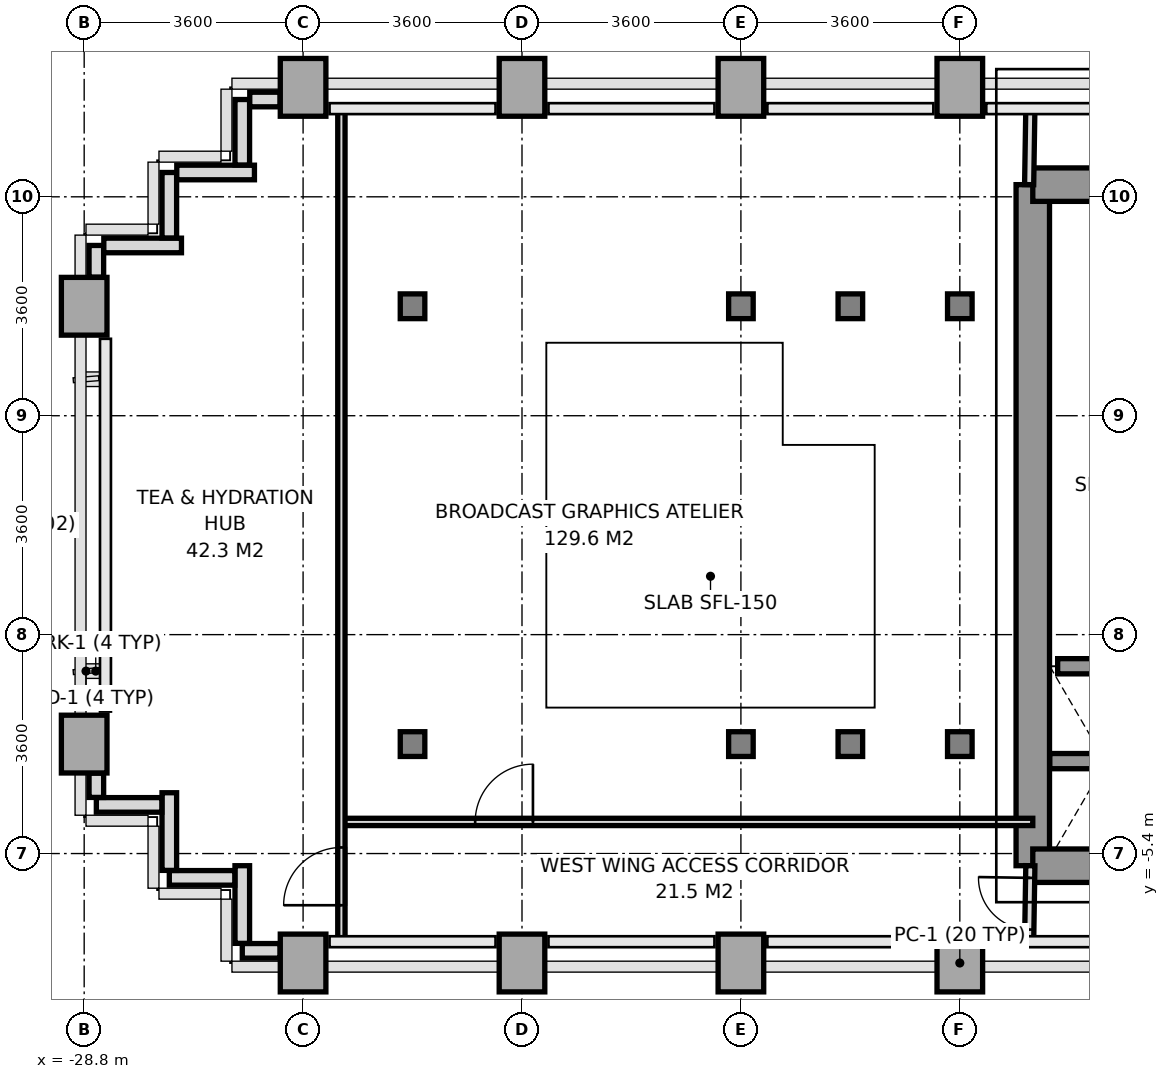
"""IFC4 building model, lengths in metres.
Left out: names, types, materials, properties, quantities, classifications, styles, units other than length and angle.
Written with IfcOpenShell. Run it as: python <this file> out.ifc"""

import sys

from ifc_helpers import new_model, si_unit, direction, frame, frame_2d, origin, origin_2d, place, context, subcontext, project, spatial, rectangle, i_section, extrude, source, transform, mapped, element, fill, save


model = new_model("IFC4")
c1 = context("Model", 3, precision=1e-05, world=origin(), true_north=direction((0.0, 1.0)))
c2 = subcontext(c1, "Body", "Model", "MODEL_VIEW")
j1 = project(units=[si_unit("LENGTHUNIT", "METRE"), si_unit("PLANEANGLEUNIT", "RADIAN")], contexts=[c1])
p1 = place(None, origin())
s1 = spatial("IfcSite", under=j1, at=p1, CompositionType="ELEMENT")
p2 = place(p1, origin())
s2 = spatial("IfcBuilding", under=s1, at=p2, CompositionType="ELEMENT")
p3 = place(p2, frame((0.0, 0.0, 51.0)))
s3 = spatial("IfcBuildingStorey", under=s2, at=p3, CompositionType="ELEMENT", Elevation=51.0)
m1 = source(origin(), c2, "Body", "SweptSolid", [
    extrude(rectangle(XDim=0.75, YDim=0.95, at=origin_2d()), origin(), (0.0, 0.0, 1.0), 3.2),
])
for number, where, z_axis, x_axis in (
    (1, (-28.8, -3.6, 0.0), (0.0, 0.0, 1.0), (1.0, 0.0, 0.0)),
    (2, (-28.8, 3.6, 0.0), (0.0, 0.0, 1.0), (1.0, 0.0, 0.0)),
    (3, (-25.2, -7.2, 0.0), (0.0, 0.0, 1.0), (1.0, 0.0, 0.0)),
    (4, (-25.2, 7.2, 0.0), (0.0, 0.0, 1.0), (1.0, 0.0, 0.0)),
):
    element("IfcColumn", number, at=place(p3, frame(where, z_axis=z_axis, x_axis=x_axis)), inside=s3, PredefinedType="COLUMN", context=c2, shape_type="MappedRepresentation", body=[
        mapped(m1, transform((0.0, 0.0, 0.0), x_axis=(1.0, 0.0, 0.0), y_axis=(0.0, 1.0, 0.0), z_axis=(0.0, 0.0, 1.0), scale=1.0)),
    ])
m2 = source(origin(), c2, "Body", "SweptSolid", [
    extrude(i_section(OverallWidth=0.404, OverallDepth=0.407, WebThickness=0.022, FlangeThickness=0.035, at=origin_2d()), origin(), (0.0, 0.0, 1.0), 3.2),
])
for number, where, z_axis, x_axis in (
    (5, (-23.4, -3.6, 0.0), (0.0, 0.0, 1.0), (1.0, 0.0, 0.0)),
    (6, (-23.4, 3.6, 0.0), (0.0, 0.0, 1.0), (1.0, 0.0, 0.0)),
):
    element("IfcColumn", number, at=place(p3, frame(where, z_axis=z_axis, x_axis=x_axis)), inside=s3, PredefinedType="COLUMN", context=c2, shape_type="MappedRepresentation", body=[
        mapped(m2, transform((0.0, 0.0, 0.0), x_axis=(1.0, 0.0, 0.0), y_axis=(0.0, 1.0, 0.0), z_axis=(0.0, 0.0, 1.0), scale=1.0)),
    ])
for number, where, z_axis, x_axis in (
    (7, (-21.6, -7.2, 0.0), (0.0, 0.0, 1.0), (1.0, 0.0, 0.0)),
    (8, (-21.6, 7.2, 0.0), (0.0, 0.0, 1.0), (1.0, 0.0, 0.0)),
    (9, (-18.0, -7.2, 0.0), (0.0, 0.0, 1.0), (1.0, 0.0, 0.0)),
):
    element("IfcColumn", number, at=place(p3, frame(where, z_axis=z_axis, x_axis=x_axis)), inside=s3, PredefinedType="COLUMN", context=c2, shape_type="MappedRepresentation", body=[
        mapped(m1, transform((0.0, 0.0, 0.0), x_axis=(1.0, 0.0, 0.0), y_axis=(0.0, 1.0, 0.0), z_axis=(0.0, 0.0, 1.0), scale=1.0)),
    ])
for number, where, z_axis, x_axis in (
    (10, (-18.0, -3.6, 0.0), (0.0, 0.0, 1.0), (1.0, 0.0, 0.0)),
    (11, (-18.0, 3.6, 0.0), (0.0, 0.0, 1.0), (1.0, 0.0, 0.0)),
):
    element("IfcColumn", number, at=place(p3, frame(where, z_axis=z_axis, x_axis=x_axis)), inside=s3, PredefinedType="COLUMN", context=c2, shape_type="MappedRepresentation", body=[
        mapped(m2, transform((0.0, 0.0, 0.0), x_axis=(1.0, 0.0, 0.0), y_axis=(0.0, 1.0, 0.0), z_axis=(0.0, 0.0, 1.0), scale=1.0)),
    ])
p4 = place(p3, frame((-18.0, 7.2, 0.0), z_axis=(0.0, 0.0, 1.0), x_axis=(1.0, 0.0, 0.0)))
e12 = element("IfcColumn", 12, at=p4, inside=s3, PredefinedType="COLUMN", context=c2, shape_type="MappedRepresentation", body=[
    mapped(m1, transform((0.0, 0.0, 0.0), x_axis=(1.0, 0.0, 0.0), y_axis=(0.0, 1.0, 0.0), z_axis=(0.0, 0.0, 1.0), scale=1.0)),
])
for number, where, z_axis, x_axis in (
    (13, (-16.2, -3.6, 0.0), (0.0, 0.0, 1.0), (1.0, 0.0, 0.0)),
    (14, (-16.2, 3.6, 0.0), (0.0, 0.0, 1.0), (1.0, 0.0, 0.0)),
):
    element("IfcColumn", number, at=place(p3, frame(where, z_axis=z_axis, x_axis=x_axis)), inside=s3, PredefinedType="COLUMN", context=c2, shape_type="MappedRepresentation", body=[
        mapped(m2, transform((0.0, 0.0, 0.0), x_axis=(1.0, 0.0, 0.0), y_axis=(0.0, 1.0, 0.0), z_axis=(0.0, 0.0, 1.0), scale=1.0)),
    ])
p5 = place(p3, frame((-14.4, -7.2, 0.0), z_axis=(0.0, 0.0, 1.0), x_axis=(1.0, 0.0, 0.0)))
e15 = element("IfcColumn", 15, at=p5, inside=s3, PredefinedType="COLUMN", context=c2, shape_type="MappedRepresentation", body=[
    mapped(m1, transform((0.0, 0.0, 0.0), x_axis=(1.0, 0.0, 0.0), y_axis=(0.0, 1.0, 0.0), z_axis=(0.0, 0.0, 1.0), scale=1.0)),
])
for number, where, z_axis, x_axis in (
    (16, (-14.4, -3.6, 0.0), (0.0, 0.0, 1.0), (1.0, 0.0, 0.0)),
    (17, (-14.4, 3.6, 0.0), (0.0, 0.0, 1.0), (1.0, 0.0, 0.0)),
):
    element("IfcColumn", number, at=place(p3, frame(where, z_axis=z_axis, x_axis=x_axis)), inside=s3, PredefinedType="COLUMN", context=c2, shape_type="MappedRepresentation", body=[
        mapped(m2, transform((0.0, 0.0, 0.0), x_axis=(1.0, 0.0, 0.0), y_axis=(0.0, 1.0, 0.0), z_axis=(0.0, 0.0, 1.0), scale=1.0)),
    ])
p6 = place(p3, frame((-14.4, 7.2, 0.0), z_axis=(0.0, 0.0, 1.0), x_axis=(1.0, 0.0, 0.0)))
e18 = element("IfcColumn", 18, at=p6, inside=s3, PredefinedType="COLUMN", context=c2, shape_type="MappedRepresentation", body=[
    mapped(m1, transform((0.0, 0.0, 0.0), x_axis=(1.0, 0.0, 0.0), y_axis=(0.0, 1.0, 0.0), z_axis=(0.0, 0.0, 1.0), scale=1.0)),
])
p7 = place(p3, frame((-25.578, -7.0, 0.0), z_axis=(0.0, 0.0, 1.0), x_axis=(-1.0, 0.0, 0.0)))
e19 = element("IfcWall", 19, at=p7, inside=s3, PredefinedType="PARAPET", context=c2, shape_type="SweptSolid", body=[
    extrude(rectangle(XDim=0.622, YDim=0.24, at=frame_2d((0.311, 0.0))), origin(), (0.0, 0.0, 1.0), 1.15),
])
p8 = place(p3, frame((-26.2, -6.877, 0.0), z_axis=(0.0, 0.0, 1.0), x_axis=(0.0, 1.0, 0.0)))
e20 = element("IfcWall", 20, at=p8, inside=s3, PredefinedType="PARAPET", context=c2, shape_type="SweptSolid", body=[
    extrude(rectangle(XDim=1.277, YDim=0.24, at=frame_2d((0.638, 0.0))), origin(), (0.0, 0.0, 1.0), 1.15),
])
p9 = place(p3, frame((-26.323, -5.8, 0.0), z_axis=(0.0, 0.0, 1.0), x_axis=(-1.0, 0.0, 0.0)))
e21 = element("IfcWall", 21, at=p9, inside=s3, PredefinedType="PARAPET", context=c2, shape_type="SweptSolid", body=[
    extrude(rectangle(XDim=1.077, YDim=0.24, at=frame_2d((0.539, 0.0))), origin(), (0.0, 0.0, 1.0), 1.15),
])
p10 = place(p3, frame((-27.4, -5.677, 0.0), z_axis=(0.0, 0.0, 1.0), x_axis=(0.0, 1.0, 0.0)))
e22 = element("IfcWall", 22, at=p10, inside=s3, PredefinedType="PARAPET", context=c2, shape_type="SweptSolid", body=[
    extrude(rectangle(XDim=1.277, YDim=0.24, at=frame_2d((0.639, 0.0))), origin(), (0.0, 0.0, 1.0), 1.15),
])
p11 = place(p3, frame((-27.523, -4.6, 0.0), z_axis=(0.0, 0.0, 1.0), x_axis=(-1.0, 0.0, 0.0)))
e23 = element("IfcWall", 23, at=p11, inside=s3, PredefinedType="PARAPET", context=c2, shape_type="SweptSolid", body=[
    extrude(rectangle(XDim=1.077, YDim=0.24, at=frame_2d((0.539, 0.0))), origin(), (0.0, 0.0, 1.0), 1.15),
])
p12 = place(p3, frame((-28.6, -4.477, 0.0), z_axis=(0.0, 0.0, 1.0), x_axis=(0.0, 1.0, 0.0)))
e24 = element("IfcWall", 24, at=p12, inside=s3, PredefinedType="PARAPET", context=c2, shape_type="SweptSolid", body=[
    extrude(rectangle(XDim=0.399, YDim=0.24, at=frame_2d((0.2, 0.0))), origin(), (0.0, 0.0, 1.0), 1.15),
])
p13 = place(p3, frame((-28.6, 4.078, 0.0), z_axis=(0.0, 0.0, 1.0), x_axis=(0.0, 1.0, 0.0)))
e25 = element("IfcWall", 25, at=p13, inside=s3, PredefinedType="PARAPET", context=c2, shape_type="SweptSolid", body=[
    extrude(rectangle(XDim=0.522, YDim=0.24, at=frame_2d((0.261, 0.0))), origin(), (0.0, 0.0, 1.0), 1.15),
])
p14 = place(p3, frame((-28.477, 4.6, 0.0), z_axis=(0.0, 0.0, 1.0), x_axis=(1.0, 0.0, 0.0)))
e26 = element("IfcWall", 26, at=p14, inside=s3, PredefinedType="PARAPET", context=c2, shape_type="SweptSolid", body=[
    extrude(rectangle(XDim=1.277, YDim=0.24, at=frame_2d((0.639, 0.0))), origin(), (0.0, 0.0, 1.0), 1.15),
])
p15 = place(p3, frame((-27.4, 4.723, 0.0), z_axis=(0.0, 0.0, 1.0), x_axis=(0.0, 1.0, 0.0)))
e27 = element("IfcWall", 27, at=p15, inside=s3, PredefinedType="PARAPET", context=c2, shape_type="SweptSolid", body=[
    extrude(rectangle(XDim=1.077, YDim=0.24, at=frame_2d((0.539, 0.0))), origin(), (0.0, 0.0, 1.0), 1.15),
])
p16 = place(p3, frame((-27.277, 5.8, 0.0), z_axis=(0.0, 0.0, 1.0), x_axis=(1.0, 0.0, 0.0)))
e28 = element("IfcWall", 28, at=p16, inside=s3, PredefinedType="PARAPET", context=c2, shape_type="SweptSolid", body=[
    extrude(rectangle(XDim=1.277, YDim=0.24, at=frame_2d((0.639, 0.0))), origin(), (0.0, 0.0, 1.0), 1.15),
])
p17 = place(p3, frame((-26.2, 5.923, 0.0), z_axis=(0.0, 0.0, 1.0), x_axis=(0.0, 1.0, 0.0)))
e29 = element("IfcWall", 29, at=p17, inside=s3, PredefinedType="PARAPET", context=c2, shape_type="SweptSolid", body=[
    extrude(rectangle(XDim=1.077, YDim=0.24, at=frame_2d((0.539, 0.0))), origin(), (0.0, 0.0, 1.0), 1.15),
])
p18 = place(p3, frame((-26.077, 7.0, 0.0), z_axis=(0.0, 0.0, 1.0), x_axis=(1.0, 0.0, 0.0)))
e30 = element("IfcWall", 30, at=p18, inside=s3, PredefinedType="PARAPET", context=c2, shape_type="SweptSolid", body=[
    extrude(rectangle(XDim=0.499, YDim=0.24, at=frame_2d((0.25, 0.0))), origin(), (0.0, 0.0, 1.0), 1.15),
])
p19 = place(p3, frame((-13.2, -5.6, 0.0), z_axis=(0.0, 0.0, 1.0), x_axis=(0.0, 1.0, 0.0)))
e31 = element("IfcWall", 31, at=p19, inside=s3, PredefinedType="SHEAR", context=c2, shape_type="SweptSolid", body=[
    extrude(rectangle(XDim=11.2, YDim=0.55, at=frame_2d((5.6, 0.0))), origin(), (0.0, 0.0, 1.0), 3.2),
])
p20 = place(p3, frame((-13.2, 5.6, 0.0), z_axis=(0.0, 0.0, 1.0), x_axis=(1.0, 0.0, 0.0)))
e32 = element("IfcWall", 32, at=p20, inside=s3, PredefinedType="SHEAR", context=c2, shape_type="SweptSolid", body=[
    extrude(rectangle(XDim=1.819, YDim=0.55, at=frame_2d((0.909, 0.0))), origin(), (0.0, 0.0, 1.0), 3.2),
])
p21 = place(p3, frame((-13.2, -5.6, 0.0), z_axis=(0.0, 0.0, 1.0), x_axis=(1.0, 0.0, 0.0)))
e33 = element("IfcWall", 33, at=p21, inside=s3, PredefinedType="SHEAR", context=c2, shape_type="SweptSolid", body=[
    extrude(rectangle(XDim=7.8, YDim=0.55, at=frame_2d((3.9, 0.0))), origin(), (0.0, 0.0, 1.0), 3.2),
])
p22 = place(p21, frame((3.6, 0.0, 0.0)))
e34 = element("IfcOpeningElement", 34, at=p22, cuts=e33, PredefinedType="OPENING", context=c2, shape_type="SweptSolid", body=[
    extrude(rectangle(XDim=1.2, YDim=2.2, at=frame_2d((0.6, 1.1))), frame((0.0, 0.285, 0.0), z_axis=(0.0, -1.0, 0.0), x_axis=(1.0, 0.0, 0.0)), (0.0, 0.0, 1.0), 0.57),
])
p23 = place(p3, frame((-12.92, -3.88, 0.0), z_axis=(0.0, 0.0, 1.0), x_axis=(1.0, 0.0, 0.0)))
e35 = element("IfcWall", 35, at=p23, inside=s3, PredefinedType="SOLIDWALL", context=c2, shape_type="SweptSolid", body=[
    extrude(rectangle(XDim=1.84, YDim=0.25, at=frame_2d((0.92, 0.0))), origin(), (0.0, 0.0, 1.0), 3.2),
])
p24 = place(p3, frame((-12.791, -2.32, 0.0), z_axis=(0.0, 0.0, 1.0), x_axis=(1.0, 0.0, 0.0)))
e36 = element("IfcWall", 36, at=p24, inside=s3, PredefinedType="SOLIDWALL", context=c2, shape_type="SweptSolid", body=[
    extrude(rectangle(XDim=1.582, YDim=0.25, at=frame_2d((0.791, 0.0))), origin(), (0.0, 0.0, 1.0), 3.2),
])
p25 = place(p3, frame((-13.26, 5.6, 0.0), z_axis=(0.0, 0.0, 1.0), x_axis=(0.016013571389, 0.999871774545, 0.0)))
e37 = element("IfcWall", 37, at=p25, inside=s3, PredefinedType="PARTITIONING", context=c2, shape_type="SweptSolid", body=[
    extrude(rectangle(XDim=1.25, YDim=0.15, at=frame_2d((0.625, 0.0))), origin(), (0.0, 0.0, 1.0), 3.2),
])
p26 = place(p3, frame((-13.26, -6.85, 0.0), z_axis=(0.0, 0.0, 1.0), x_axis=(0.016013571389, 0.999871774545, 0.0)))
e38 = element("IfcWall", 38, at=p26, inside=s3, PredefinedType="PARTITIONING", context=c2, shape_type="SweptSolid", body=[
    extrude(rectangle(XDim=1.25, YDim=0.15, at=frame_2d((0.625, 0.0))), origin(), (0.0, 0.0, 1.0), 3.2),
])
p27 = place(p26, frame((0.2, 0.0, 0.0)))
e39 = element("IfcOpeningElement", 39, at=p27, cuts=e38, PredefinedType="OPENING", context=c2, shape_type="SweptSolid", body=[
    extrude(rectangle(XDim=0.85, YDim=2.1, at=frame_2d((0.425, 1.05))), frame((0.0, 0.085, 0.0), z_axis=(0.0, -1.0, 0.0), x_axis=(1.0, 0.0, 0.0)), (0.0, 0.0, 1.0), 0.17),
])
p28 = place(p3, frame((-24.57, -4.88, 0.0), z_axis=(0.0, 0.0, 1.0), x_axis=(1.0, 0.0, 0.0)))
e40 = element("IfcWall", 40, at=p28, inside=s3, PredefinedType="PARTITIONING", context=c2, shape_type="SweptSolid", body=[
    extrude(rectangle(XDim=11.37, YDim=0.12, at=frame_2d((5.685, 0.0))), origin(), (0.0, 0.0, 1.0), 2.7),
])
p29 = place(p28, frame((2.2, 0.0, 0.0)))
e41 = element("IfcOpeningElement", 41, at=p29, cuts=e40, PredefinedType="OPENING", context=c2, shape_type="SweptSolid", body=[
    extrude(rectangle(XDim=0.95, YDim=2.15, at=frame_2d((0.475, 1.075))), frame((0.0, 0.07, 0.0), z_axis=(0.0, -1.0, 0.0), x_axis=(1.0, 0.0, 0.0)), (0.0, 0.0, 1.0), 0.14),
])
p30 = place(p3, frame((-24.57, -6.85, 0.0), z_axis=(0.0, 0.0, 1.0), x_axis=(0.0, 1.0, 0.0)))
e42 = element("IfcWall", 42, at=p30, inside=s3, PredefinedType="PARTITIONING", context=c2, shape_type="SweptSolid", body=[
    extrude(rectangle(XDim=13.7, YDim=0.12, at=frame_2d((6.85, 0.0))), origin(), (0.0, 0.0, 1.0), 2.65),
])
p31 = place(p30, frame((0.6, 0.0, 0.0)))
e43 = element("IfcOpeningElement", 43, at=p31, cuts=e42, PredefinedType="OPENING", context=c2, shape_type="SweptSolid", body=[
    extrude(rectangle(XDim=0.95, YDim=2.15, at=frame_2d((0.475, 1.075))), frame((0.0, 0.07, 0.0), z_axis=(0.0, -1.0, 0.0), x_axis=(1.0, 0.0, 0.0)), (0.0, 0.0, 1.0), 0.14),
])
m3 = source(origin(), c2, "Body", "SweptSolid", [
    extrude(rectangle(XDim=0.95, YDim=2.15, at=frame_2d((0.475, 1.075))), frame((0.0, 0.025, 0.0), z_axis=(0.0, -1.0, 0.0), x_axis=(1.0, 0.0, 0.0)), (0.0, 0.0, 1.0), 0.05),
])
p32 = place(p29, origin())
e44 = element("IfcDoor", 44, at=p32, inside=s3, OperationType="SINGLE_SWING_RIGHT", PredefinedType="DOOR", context=c2, shape_type="MappedRepresentation", body=[
    mapped(m3, transform((0.0, 0.0, 0.0), x_axis=(1.0, 0.0, 0.0), y_axis=(0.0, 1.0, 0.0), z_axis=(0.0, 0.0, 1.0), scale=1.0)),
])
fill(e41, e44)
p33 = place(p31, origin())
e45 = element("IfcDoor", 45, at=p33, inside=s3, OperationType="SINGLE_SWING_LEFT", PredefinedType="DOOR", context=c2, shape_type="MappedRepresentation", body=[
    mapped(m3, transform((0.0, 0.0, 0.0), x_axis=(1.0, 0.0, 0.0), y_axis=(0.0, 1.0, 0.0), z_axis=(0.0, 0.0, 1.0), scale=1.0)),
])
fill(e43, e45)
m4 = source(origin(), c2, "Body", "SweptSolid", [
    extrude(rectangle(XDim=0.85, YDim=2.1, at=frame_2d((0.425, 1.05))), frame((0.0, 0.025, 0.0), z_axis=(0.0, -1.0, 0.0), x_axis=(1.0, 0.0, 0.0)), (0.0, 0.0, 1.0), 0.05),
])
p34 = place(p27, origin())
e46 = element("IfcDoor", 46, at=p34, inside=s3, OperationType="SINGLE_SWING_RIGHT", PredefinedType="DOOR", context=c2, shape_type="MappedRepresentation", body=[
    mapped(m4, transform((0.0, 0.0, 0.0), x_axis=(1.0, 0.0, 0.0), y_axis=(0.0, 1.0, 0.0), z_axis=(0.0, 0.0, 1.0), scale=1.0)),
])
fill(e39, e46)
save(model, sys.argv[1])
